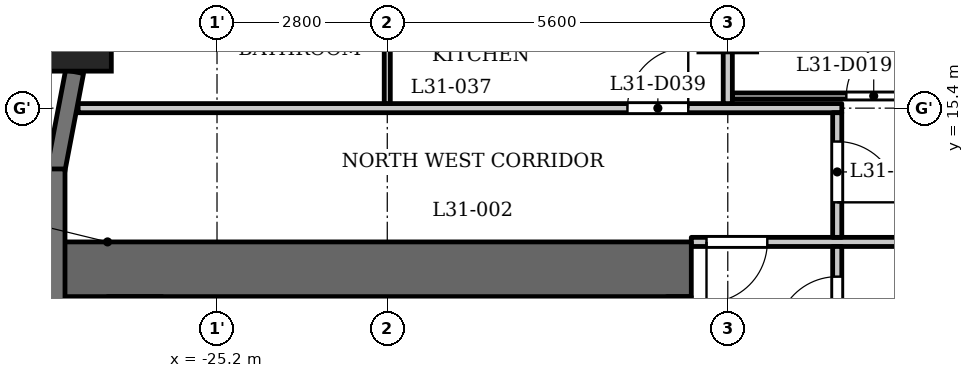
"""IFC4 building model, lengths in metres.
Left out: names, types, materials, properties, quantities, classifications, styles, units other than length and angle.
Written with IfcOpenShell. Run it as: python <this file> out.ifc"""

import sys

from ifc_helpers import new_model, si_unit, direction, frame, frame_2d, origin, origin_2d, place, context, subcontext, project, spatial, rectangle, extrude, element, fill, save


model = new_model("IFC4")
c1 = context("Model", 3, precision=1e-05, world=origin(), true_north=direction((0.0, 1.0)))
c2 = subcontext(c1, "Body", "Model", "MODEL_VIEW")
j1 = project(units=[si_unit("LENGTHUNIT", "METRE"), si_unit("PLANEANGLEUNIT", "RADIAN")], contexts=[c1])
p1 = place(None, origin())
s1 = spatial("IfcSite", under=j1, at=p1, CompositionType="ELEMENT")
p2 = place(p1, origin())
s2 = spatial("IfcBuilding", under=s1, at=p2, CompositionType="ELEMENT")
p3 = place(p2, frame((0.0, 0.0, 121.8)))
s3 = spatial("IfcBuildingStorey", under=s2, at=p3, CompositionType="ELEMENT", Elevation=121.8)
p4 = place(p3, frame((-27.538, 16.609, 0.0), z_axis=(0.0, 0.0, 1.0), x_axis=(1.0, 0.0, 0.0)))
e1 = element("IfcColumn", 1, at=p4, inside=s3, PredefinedType="COLUMN", context=c2, shape_type="SweptSolid", body=[
    extrude(rectangle(XDim=1.2, YDim=1.2, at=origin_2d()), origin(), (0.0, 0.0, 1.0), 3.5),
])
p5 = place(p3, frame((-16.8, 16.8, 0.0), z_axis=(0.0, 0.0, 1.0), x_axis=(1.0, 0.0, 0.0)))
e2 = element("IfcColumn", 2, at=p5, inside=s3, PredefinedType="COLUMN", context=c2, shape_type="SweptSolid", body=[
    extrude(rectangle(XDim=0.95, YDim=0.95, at=origin_2d()), origin(), (0.0, 0.0, 1.0), 3.5),
])
p6 = place(p3, frame((-27.542, 15.999, 0.0), z_axis=(0.0, 0.0, 1.0), x_axis=(-0.187349172861, -0.982293381546, 0.0)))
e3 = element("IfcWall", 3, at=p6, inside=s3, PredefinedType="SOLIDWALL", context=c2, shape_type="SweptSolid", body=[
    extrude(rectangle(XDim=1.656, YDim=0.3, at=frame_2d((0.828, 0.0))), origin(), (0.0, 0.0, 1.0), 2.35),
])
p7 = place(p3, frame((-27.85, 14.4, 0.0), z_axis=(0.0, 0.0, 1.0), x_axis=(0.0, -1.0, 0.0)))
e4 = element("IfcWall", 4, at=p7, inside=s3, PredefinedType="SOLIDWALL", context=c2, shape_type="SweptSolid", body=[
    extrude(rectangle(XDim=2.6, YDim=0.3, at=frame_2d((1.3, 0.0))), origin(), (0.0, 0.0, 1.0), 2.35),
])
p8 = place(p3, frame((-17.4, 12.75, 0.0), z_axis=(0.0, 0.0, 1.0), x_axis=(-1.0, 0.0, 0.0)))
e5 = element("IfcWall", 5, at=p8, inside=s3, PredefinedType="SHEAR", context=c2, shape_type="SweptSolid", body=[
    extrude(rectangle(XDim=10.4, YDim=0.9, at=frame_2d((5.2, 0.0))), origin(), (0.0, 0.0, 1.0), 3.15),
])
p9 = place(p3, frame((-17.6, -12.3, 0.0), z_axis=(0.0, 0.0, 1.0), x_axis=(0.0, 1.0, 0.0)))
e6 = element("IfcWall", 6, at=p9, inside=s3, PredefinedType="SHEAR", context=c2, shape_type="SweptSolid", body=[
    extrude(rectangle(XDim=24.6, YDim=0.4, at=frame_2d((12.3, 0.0))), origin(), (0.0, 0.0, 1.0), 3.15),
])
p10 = place(p9, frame((6.0, 0.0, 0.0)))
e7 = element("IfcOpeningElement", 7, at=p10, cuts=e6, PredefinedType="OPENING", context=c2, shape_type="SweptSolid", body=[
    extrude(rectangle(XDim=1.1, YDim=2.1, at=frame_2d((0.55, 1.05))), frame((0.0, 0.21, 0.0), z_axis=(0.0, -1.0, 0.0), x_axis=(1.0, 0.0, 0.0)), (0.0, 0.0, 1.0), 0.42),
])
p11 = place(p9, frame((8.4, 0.0, 0.0)))
e8 = element("IfcOpeningElement", 8, at=p11, cuts=e6, PredefinedType="OPENING", context=c2, shape_type="SweptSolid", body=[
    extrude(rectangle(XDim=1.1, YDim=2.1, at=frame_2d((0.55, 1.05))), frame((0.0, 0.21, 0.0), z_axis=(0.0, -1.0, 0.0), x_axis=(1.0, 0.0, 0.0)), (0.0, 0.0, 1.0), 0.42),
])
p12 = place(p9, frame((10.8, 0.0, 0.0)))
e9 = element("IfcOpeningElement", 9, at=p12, cuts=e6, PredefinedType="OPENING", context=c2, shape_type="SweptSolid", body=[
    extrude(rectangle(XDim=1.1, YDim=2.1, at=frame_2d((0.55, 1.05))), frame((0.0, 0.21, 0.0), z_axis=(0.0, -1.0, 0.0), x_axis=(1.0, 0.0, 0.0)), (0.0, 0.0, 1.0), 0.42),
])
p13 = place(p9, frame((22.8, 0.0, 0.0)))
e10 = element("IfcOpeningElement", 10, at=p13, cuts=e6, PredefinedType="OPENING", context=c2, shape_type="SweptSolid", body=[
    extrude(rectangle(XDim=1.1, YDim=2.1, at=frame_2d((0.55, 1.05))), frame((0.0, 0.21, 0.0), z_axis=(0.0, -1.0, 0.0), x_axis=(1.0, 0.0, 0.0)), (0.0, 0.0, 1.0), 0.42),
])
p14 = place(p9, frame((0.7, 0.0, 0.0)))
e11 = element("IfcOpeningElement", 11, at=p14, cuts=e6, PredefinedType="OPENING", context=c2, shape_type="SweptSolid", body=[
    extrude(rectangle(XDim=1.1, YDim=2.1, at=frame_2d((0.55, 1.05))), frame((0.0, 0.21, 0.0), z_axis=(0.0, -1.0, 0.0), x_axis=(1.0, 0.0, 0.0)), (0.0, 0.0, 1.0), 0.42),
])
p15 = place(p9, frame((12.775, 0.0, 0.0)))
e12 = element("IfcOpeningElement", 12, at=p15, cuts=e6, PredefinedType="OPENING", context=c2, shape_type="SweptSolid", body=[
    extrude(rectangle(XDim=1.8, YDim=2.1, at=frame_2d((0.9, 1.05))), frame((0.0, 0.21, 0.0), z_axis=(0.0, -1.0, 0.0), x_axis=(1.0, 0.0, 0.0)), (0.0, 0.0, 1.0), 0.42),
])
p16 = place(p3, frame((-26.55, -12.3, 0.0), z_axis=(0.0, 0.0, 1.0), x_axis=(0.0, 1.0, 0.0)))
e13 = element("IfcWall", 13, at=p16, inside=s3, PredefinedType="SHEAR", context=c2, shape_type="SweptSolid", body=[
    extrude(rectangle(XDim=24.6, YDim=0.9, at=frame_2d((12.3, 0.0))), origin(), (0.0, 0.0, 1.0), 3.15),
])
p17 = place(p3, frame((-23.55, 9.8, 0.0), z_axis=(0.0, 0.0, 1.0), x_axis=(0.0, 1.0, 0.0)))
e14 = element("IfcWall", 14, at=p17, inside=s3, PredefinedType="PARTITIONING", context=c2, shape_type="SweptSolid", body=[
    extrude(rectangle(XDim=2.5, YDim=0.2, at=frame_2d((1.25, 0.0))), origin(), (0.0, 0.0, 1.0), 3.15),
])
p18 = place(p17, frame((0.8, 0.0, 0.0)))
e15 = element("IfcOpeningElement", 15, at=p18, cuts=e14, PredefinedType="OPENING", context=c2, shape_type="SweptSolid", body=[
    extrude(rectangle(XDim=0.9, YDim=2.1, at=frame_2d((0.45, 1.05))), frame((0.0, 0.11, 0.0), z_axis=(0.0, -1.0, 0.0), x_axis=(1.0, 0.0, 0.0)), (0.0, 0.0, 1.0), 0.22),
])
p19 = place(p3, frame((-17.4, 13.2, 0.0), z_axis=(0.0, 0.0, 1.0), x_axis=(1.0, 0.0, 0.0)))
e16 = element("IfcWall", 16, at=p19, inside=s3, PredefinedType="PARTITIONING", context=c2, shape_type="SweptSolid", body=[
    extrude(rectangle(XDim=34.8, YDim=0.15, at=frame_2d((17.4, 0.0))), origin(), (0.0, 0.0, 1.0), 3.15),
])
p20 = place(p19, frame((0.25, 0.0, 0.0)))
e17 = element("IfcOpeningElement", 17, at=p20, cuts=e16, PredefinedType="OPENING", context=c2, shape_type="SweptSolid", body=[
    extrude(rectangle(XDim=1.0, YDim=2.1, at=frame_2d((0.5, 1.05))), frame((0.0, 0.085, 0.0), z_axis=(0.0, -1.0, 0.0), x_axis=(1.0, 0.0, 0.0)), (0.0, 0.0, 1.0), 0.17),
])
p21 = place(p19, frame((33.65, 0.0, 0.0)))
e18 = element("IfcOpeningElement", 18, at=p21, cuts=e16, PredefinedType="OPENING", context=c2, shape_type="SweptSolid", body=[
    extrude(rectangle(XDim=1.0, YDim=2.1, at=frame_2d((0.5, 1.05))), frame((0.0, 0.085, 0.0), z_axis=(0.0, -1.0, 0.0), x_axis=(1.0, 0.0, 0.0)), (0.0, 0.0, 1.0), 0.17),
])
p22 = place(p19, frame((15.75, 0.0, 0.0)))
e19 = element("IfcOpeningElement", 19, at=p22, cuts=e16, PredefinedType="OPENING", context=c2, shape_type="SweptSolid", body=[
    extrude(rectangle(XDim=1.0, YDim=2.1, at=frame_2d((0.5, 1.05))), frame((0.0, 0.085, 0.0), z_axis=(0.0, -1.0, 0.0), x_axis=(1.0, 0.0, 0.0)), (0.0, 0.0, 1.0), 0.17),
])
p23 = place(p19, frame((18.1, 0.0, 0.0)))
e20 = element("IfcOpeningElement", 20, at=p23, cuts=e16, PredefinedType="OPENING", context=c2, shape_type="SweptSolid", body=[
    extrude(rectangle(XDim=1.0, YDim=2.1, at=frame_2d((0.5, 1.05))), frame((0.0, 0.085, 0.0), z_axis=(0.0, -1.0, 0.0), x_axis=(1.0, 0.0, 0.0)), (0.0, 0.0, 1.0), 0.17),
])
p24 = place(p19, frame((23.55, 0.0, 0.0)))
e21 = element("IfcOpeningElement", 21, at=p24, cuts=e16, PredefinedType="OPENING", context=c2, shape_type="SweptSolid", body=[
    extrude(rectangle(XDim=1.0, YDim=2.1, at=frame_2d((0.5, 1.05))), frame((0.0, 0.085, 0.0), z_axis=(0.0, -1.0, 0.0), x_axis=(1.0, 0.0, 0.0)), (0.0, 0.0, 1.0), 0.17),
])
p25 = place(p3, frame((-27.484, 15.4, 0.0), z_axis=(0.0, 0.0, 1.0), x_axis=(1.0, 0.0, 0.0)))
e22 = element("IfcWall", 22, at=p25, inside=s3, PredefinedType="PARTITIONING", context=c2, shape_type="SweptSolid", body=[
    extrude(rectangle(XDim=12.559, YDim=0.15, at=frame_2d((6.279, 0.0))), origin(), (0.0, 0.0, 1.0), 3.15),
])
p26 = place(p25, frame((9.034, 0.0, 0.0)))
e23 = element("IfcOpeningElement", 23, at=p26, cuts=e22, PredefinedType="OPENING", context=c2, shape_type="SweptSolid", body=[
    extrude(rectangle(XDim=1.0, YDim=2.1, at=frame_2d((0.5, 1.05))), frame((0.0, 0.085, 0.0), z_axis=(0.0, -1.0, 0.0), x_axis=(1.0, 0.0, 0.0)), (0.0, 0.0, 1.0), 0.17),
])
p27 = place(p3, frame((-16.725, 15.6, 0.0), z_axis=(0.0, 0.0, 1.0), x_axis=(1.0, 0.0, 0.0)))
e24 = element("IfcWall", 24, at=p27, inside=s3, PredefinedType="PARTITIONING", context=c2, shape_type="SweptSolid", body=[
    extrude(rectangle(XDim=33.45, YDim=0.1, at=frame_2d((16.725, 0.0))), origin(), (0.0, 0.0, 1.0), 3.15),
])
p28 = place(p27, frame((9.425, 0.0, 0.0)))
e25 = element("IfcOpeningElement", 25, at=p28, cuts=e24, PredefinedType="OPENING", context=c2, shape_type="SweptSolid", body=[
    extrude(rectangle(XDim=0.8, YDim=2.1, at=frame_2d((0.4, 1.05))), frame((0.0, 0.06, 0.0), z_axis=(0.0, -1.0, 0.0), x_axis=(1.0, 0.0, 0.0)), (0.0, 0.0, 1.0), 0.12),
])
p29 = place(p27, frame((6.975, 0.0, 0.0)))
e26 = element("IfcOpeningElement", 26, at=p29, cuts=e24, PredefinedType="OPENING", context=c2, shape_type="SweptSolid", body=[
    extrude(rectangle(XDim=0.9, YDim=2.1, at=frame_2d((0.45, 1.05))), frame((0.0, 0.06, 0.0), z_axis=(0.0, -1.0, 0.0), x_axis=(1.0, 0.0, 0.0)), (0.0, 0.0, 1.0), 0.12),
])
p30 = place(p27, frame((1.875, 0.0, 0.0)))
e27 = element("IfcOpeningElement", 27, at=p30, cuts=e24, PredefinedType="OPENING", context=c2, shape_type="SweptSolid", body=[
    extrude(rectangle(XDim=0.9, YDim=2.1, at=frame_2d((0.45, 1.05))), frame((0.0, 0.06, 0.0), z_axis=(0.0, -1.0, 0.0), x_axis=(1.0, 0.0, 0.0)), (0.0, 0.0, 1.0), 0.12),
])
p31 = place(p27, frame((3.475, 0.0, 0.0)))
e28 = element("IfcOpeningElement", 28, at=p31, cuts=e24, PredefinedType="OPENING", context=c2, shape_type="SweptSolid", body=[
    extrude(rectangle(XDim=0.9, YDim=2.1, at=frame_2d((0.45, 1.05))), frame((0.0, 0.06, 0.0), z_axis=(0.0, -1.0, 0.0), x_axis=(1.0, 0.0, 0.0)), (0.0, 0.0, 1.0), 0.12),
])
p32 = place(p27, frame((11.775, 0.0, 0.0)))
e29 = element("IfcOpeningElement", 29, at=p32, cuts=e24, PredefinedType="OPENING", context=c2, shape_type="SweptSolid", body=[
    extrude(rectangle(XDim=0.8, YDim=2.1, at=frame_2d((0.4, 1.05))), frame((0.0, 0.06, 0.0), z_axis=(0.0, -1.0, 0.0), x_axis=(1.0, 0.0, 0.0)), (0.0, 0.0, 1.0), 0.12),
])
p33 = place(p27, frame((14.175, 0.0, 0.0)))
e30 = element("IfcOpeningElement", 30, at=p33, cuts=e24, PredefinedType="OPENING", context=c2, shape_type="SweptSolid", body=[
    extrude(rectangle(XDim=0.9, YDim=2.1, at=frame_2d((0.45, 1.05))), frame((0.0, 0.06, 0.0), z_axis=(0.0, -1.0, 0.0), x_axis=(1.0, 0.0, 0.0)), (0.0, 0.0, 1.0), 0.12),
])
p34 = place(p27, frame((20.725, 0.0, 0.0)))
e31 = element("IfcOpeningElement", 31, at=p34, cuts=e24, PredefinedType="OPENING", context=c2, shape_type="SweptSolid", body=[
    extrude(rectangle(XDim=0.8, YDim=2.1, at=frame_2d((0.4, 1.05))), frame((0.0, 0.06, 0.0), z_axis=(0.0, -1.0, 0.0), x_axis=(1.0, 0.0, 0.0)), (0.0, 0.0, 1.0), 0.12),
])
p35 = place(p27, frame((18.375, 0.0, 0.0)))
e32 = element("IfcOpeningElement", 32, at=p35, cuts=e24, PredefinedType="OPENING", context=c2, shape_type="SweptSolid", body=[
    extrude(rectangle(XDim=0.9, YDim=2.1, at=frame_2d((0.45, 1.05))), frame((0.0, 0.06, 0.0), z_axis=(0.0, -1.0, 0.0), x_axis=(1.0, 0.0, 0.0)), (0.0, 0.0, 1.0), 0.12),
])
p36 = place(p27, frame((26.425, 0.0, 0.0)))
e33 = element("IfcOpeningElement", 33, at=p36, cuts=e24, PredefinedType="OPENING", context=c2, shape_type="SweptSolid", body=[
    extrude(rectangle(XDim=0.8, YDim=2.1, at=frame_2d((0.4, 1.05))), frame((0.0, 0.06, 0.0), z_axis=(0.0, -1.0, 0.0), x_axis=(1.0, 0.0, 0.0)), (0.0, 0.0, 1.0), 0.12),
])
p37 = place(p27, frame((23.875, 0.0, 0.0)))
e34 = element("IfcOpeningElement", 34, at=p37, cuts=e24, PredefinedType="OPENING", context=c2, shape_type="SweptSolid", body=[
    extrude(rectangle(XDim=0.9, YDim=2.1, at=frame_2d((0.45, 1.05))), frame((0.0, 0.06, 0.0), z_axis=(0.0, -1.0, 0.0), x_axis=(1.0, 0.0, 0.0)), (0.0, 0.0, 1.0), 0.12),
])
p38 = place(p27, frame((28.575, 0.0, 0.0)))
e35 = element("IfcOpeningElement", 35, at=p38, cuts=e24, PredefinedType="OPENING", context=c2, shape_type="SweptSolid", body=[
    extrude(rectangle(XDim=0.8, YDim=2.1, at=frame_2d((0.4, 1.05))), frame((0.0, 0.06, 0.0), z_axis=(0.0, -1.0, 0.0), x_axis=(1.0, 0.0, 0.0)), (0.0, 0.0, 1.0), 0.12),
])
p39 = place(p27, frame((30.725, 0.0, 0.0)))
e36 = element("IfcOpeningElement", 36, at=p39, cuts=e24, PredefinedType="OPENING", context=c2, shape_type="SweptSolid", body=[
    extrude(rectangle(XDim=0.9, YDim=2.1, at=frame_2d((0.45, 1.05))), frame((0.0, 0.06, 0.0), z_axis=(0.0, -1.0, 0.0), x_axis=(1.0, 0.0, 0.0)), (0.0, 0.0, 1.0), 0.12),
])
p40 = place(p3, frame((-22.4, 15.475, 0.0), z_axis=(0.0, 0.0, 1.0), x_axis=(0.0, 1.0, 0.0)))
e37 = element("IfcWall", 37, at=p40, inside=s3, PredefinedType="PARTITIONING", context=c2, shape_type="SweptSolid", body=[
    extrude(rectangle(XDim=2.275, YDim=0.1, at=frame_2d((1.137, 0.0))), origin(), (0.0, 0.0, 1.0), 3.15),
])
p41 = place(p3, frame((-16.8, 15.475, 0.0), z_axis=(0.0, 0.0, 1.0), x_axis=(0.0, 1.0, 0.0)))
e38 = element("IfcWall", 38, at=p41, inside=s3, PredefinedType="PARTITIONING", context=c2, shape_type="SweptSolid", body=[
    extrude(rectangle(XDim=7.505, YDim=0.15, at=frame_2d((3.752, 0.0))), origin(), (0.0, 0.0, 1.0), 3.15),
])
p42 = place(p3, frame((-15.0, 6.769, 0.0), z_axis=(0.0, 0.0, 1.0), x_axis=(0.0, 1.0, 0.0)))
e39 = element("IfcWall", 39, at=p42, inside=s3, PredefinedType="PARTITIONING", context=c2, shape_type="SweptSolid", body=[
    extrude(rectangle(XDim=6.356, YDim=0.15, at=frame_2d((3.178, 0.0))), origin(), (0.0, 0.0, 1.0), 3.15),
])
p43 = place(p42, frame((4.86, 0.0, 0.0)))
e40 = element("IfcOpeningElement", 40, at=p43, cuts=e39, PredefinedType="OPENING", context=c2, shape_type="SweptSolid", body=[
    extrude(rectangle(XDim=1.0, YDim=2.1, at=frame_2d((0.5, 1.05))), frame((0.0, 0.085, 0.0), z_axis=(0.0, -1.0, 0.0), x_axis=(1.0, 0.0, 0.0)), (0.0, 0.0, 1.0), 0.17),
])
p44 = place(p3, frame((-15.0, 13.275, 0.0), z_axis=(0.0, 0.0, 1.0), x_axis=(0.0, 1.0, 0.0)))
e41 = element("IfcWall", 41, at=p44, inside=s3, PredefinedType="PARTITIONING", context=c2, shape_type="SweptSolid", body=[
    extrude(rectangle(XDim=2.05, YDim=0.15, at=frame_2d((1.025, 0.0))), origin(), (0.0, 0.0, 1.0), 3.15),
])
p45 = place(p44, frame((0.576, 0.0, 0.0)))
e42 = element("IfcOpeningElement", 42, at=p45, cuts=e41, PredefinedType="OPENING", context=c2, shape_type="SweptSolid", body=[
    extrude(rectangle(XDim=1.0, YDim=2.1, at=frame_2d((0.5, 1.05))), frame((0.0, 0.085, 0.0), z_axis=(0.0, -1.0, 0.0), x_axis=(1.0, 0.0, 0.0)), (0.0, 0.0, 1.0), 0.17),
])
p46 = place(p43, origin())
e43 = element("IfcDoor", 43, at=p46, inside=s3, OperationType="SINGLE_SWING_RIGHT", PredefinedType="DOOR", context=c2, shape_type="SweptSolid", body=[
    extrude(rectangle(XDim=1.0, YDim=2.1, at=frame_2d((0.5, 1.05))), frame((0.0, 0.025, 0.0), z_axis=(0.0, -1.0, 0.0), x_axis=(1.0, 0.0, 0.0)), (0.0, 0.0, 1.0), 0.05),
])
fill(e40, e43)
p47 = place(p20, origin())
e44 = element("IfcDoor", 44, at=p47, inside=s3, OperationType="SINGLE_SWING_LEFT", PredefinedType="DOOR", context=c2, shape_type="SweptSolid", body=[
    extrude(rectangle(XDim=1.0, YDim=2.1, at=frame_2d((0.5, 1.05))), frame((0.0, 0.025, 0.0), z_axis=(0.0, -1.0, 0.0), x_axis=(1.0, 0.0, 0.0)), (0.0, 0.0, 1.0), 0.05),
])
fill(e17, e44)
p48 = place(p45, origin())
e45 = element("IfcDoor", 45, at=p48, inside=s3, OperationType="SINGLE_SWING_LEFT", PredefinedType="DOOR", context=c2, shape_type="SweptSolid", body=[
    extrude(rectangle(XDim=1.0, YDim=2.1, at=frame_2d((0.5, 1.05))), frame((0.0, 0.025, 0.0), z_axis=(0.0, -1.0, 0.0), x_axis=(1.0, 0.0, 0.0)), (0.0, 0.0, 1.0), 0.05),
])
fill(e42, e45)
p49 = place(p30, origin())
e46 = element("IfcDoor", 46, at=p49, inside=s3, OperationType="SINGLE_SWING_LEFT", PredefinedType="DOOR", context=c2, shape_type="SweptSolid", body=[
    extrude(rectangle(XDim=0.9, YDim=2.1, at=frame_2d((0.45, 1.05))), frame((0.0, 0.025, 0.0), z_axis=(0.0, -1.0, 0.0), x_axis=(1.0, 0.0, 0.0)), (0.0, 0.0, 1.0), 0.05),
])
fill(e27, e46)
p50 = place(p26, origin())
e47 = element("IfcDoor", 47, at=p50, inside=s3, OperationType="SINGLE_SWING_LEFT", PredefinedType="DOOR", context=c2, shape_type="SweptSolid", body=[
    extrude(rectangle(XDim=1.0, YDim=2.1, at=frame_2d((0.5, 1.05))), frame((0.0, 0.025, 0.0), z_axis=(0.0, -1.0, 0.0), x_axis=(1.0, 0.0, 0.0)), (0.0, 0.0, 1.0), 0.05),
])
fill(e23, e47)
save(model, sys.argv[1])
